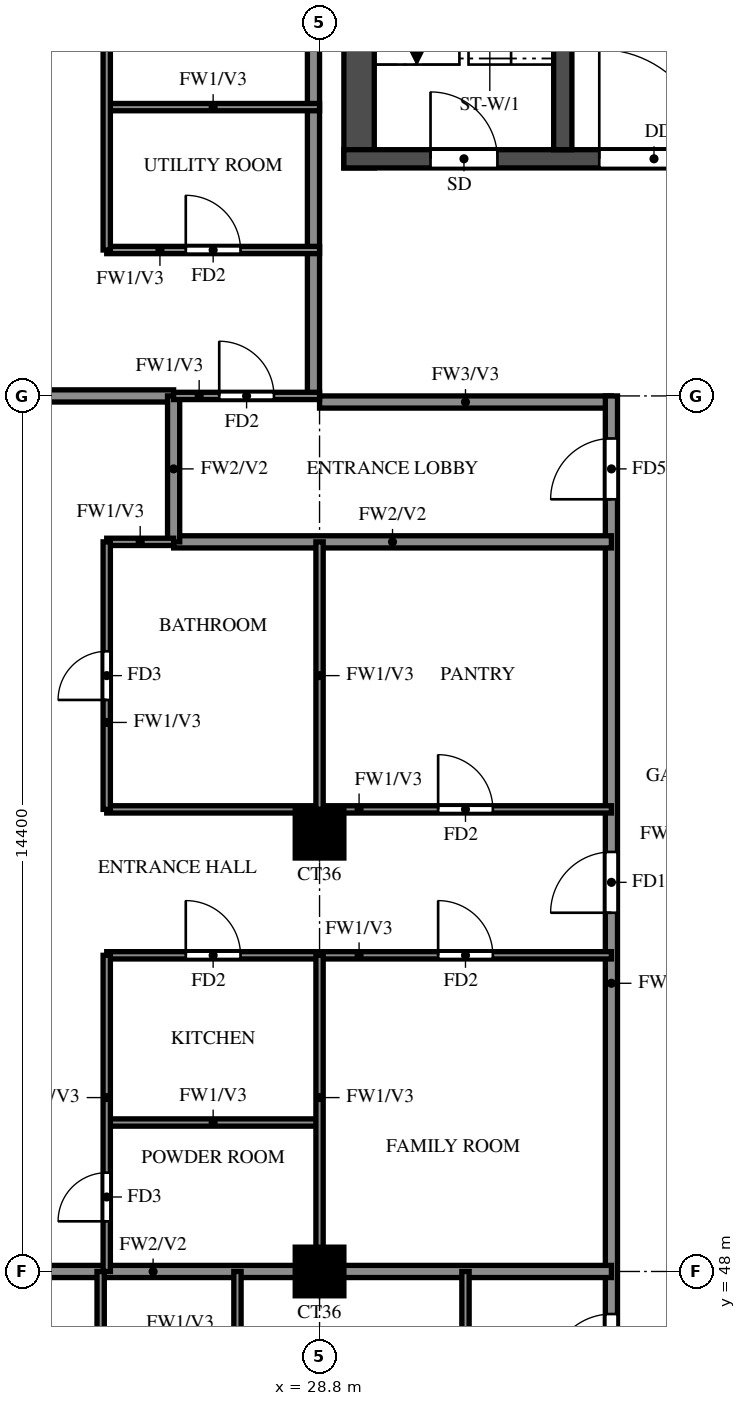
"""IFC4 building model, lengths in metres.
Left out: names, types, materials, properties, quantities, classifications, styles, units other than length and angle.
Written with IfcOpenShell. Run it as: python <this file> out.ifc"""

import sys

from ifc_helpers import new_model, si_unit, direction, frame, frame_2d, origin, origin_2d, place, context, subcontext, project, spatial, rectangle, extrude, source, transform, mapped, element, fill, save


model = new_model("IFC4")
c1 = context("Model", 3, precision=1e-05, world=origin(), true_north=direction((0.0, 1.0)))
c2 = subcontext(c1, "Body", "Model", "MODEL_VIEW")
j1 = project(units=[si_unit("LENGTHUNIT", "METRE"), si_unit("PLANEANGLEUNIT", "RADIAN")], contexts=[c1])
p1 = place(None, origin())
s1 = spatial("IfcSite", under=j1, at=p1, CompositionType="ELEMENT")
p2 = place(p1, origin())
s2 = spatial("IfcBuilding", under=s1, at=p2, CompositionType="ELEMENT")
p3 = place(p2, frame((0.0, 0.0, 250.0)))
s3 = spatial("IfcBuildingStorey", under=s2, at=p3, CompositionType="ELEMENT", Elevation=250.0)
m1 = source(origin(), c2, "Body", "SweptSolid", [
    extrude(rectangle(XDim=0.8, YDim=0.8, at=origin_2d()), origin(), (0.0, 0.0, 1.0), 3.22),
])
for number, where, z_axis, x_axis in (
    (1, (28.8, 48.0, 0.0), (0.0, 0.0, 1.0), (1.0, 0.0, 0.0)),
    (2, (28.8, 55.2, 0.0), (0.0, 0.0, 1.0), (1.0, 0.0, 0.0)),
):
    element("IfcColumn", number, at=place(p3, frame(where, z_axis=z_axis, x_axis=x_axis)), inside=s3, PredefinedType="COLUMN", context=c2, shape_type="MappedRepresentation", body=[
        mapped(m1, transform((0.0, 0.0, 0.0))),
    ])
p4 = place(p3, frame((29.45, 66.15, 0.0), z_axis=(0.0, 0.0, 1.0), x_axis=(0.0, 1.0, 0.0)))
e3 = element("IfcWall", 3, at=p4, inside=s3, PredefinedType="SHEAR", context=c2, shape_type="SweptSolid", body=[
    extrude(rectangle(XDim=11.85, YDim=0.5, at=frame_2d((5.925, 0.0))), origin(), (0.0, 0.0, 1.0), 3.22),
])
p5 = place(p3, frame((29.2, 66.3, 0.0), z_axis=(0.0, 0.0, 1.0), x_axis=(1.0, 0.0, 0.0)))
e4 = element("IfcWall", 4, at=p5, inside=s3, PredefinedType="SHEAR", context=c2, shape_type="SweptSolid", body=[
    extrude(rectangle(XDim=42.4, YDim=0.3, at=frame_2d((21.2, 0.0))), origin(), (0.0, 0.0, 1.0), 3.22),
])
p6 = place(p5, frame((1.425, 0.0, 0.0)))
e5 = element("IfcOpeningElement", 5, at=p6, cuts=e4, PredefinedType="OPENING", context=c2, shape_type="SweptSolid", body=[
    extrude(rectangle(XDim=1.1, YDim=2.1, at=frame_2d((0.55, 1.05))), frame((0.0, 0.16, 0.0), z_axis=(0.0, -1.0, 0.0), x_axis=(1.0, 0.0, 0.0)), (0.0, 0.0, 1.0), 0.32),
])
p7 = place(p5, frame((4.2, 0.0, 0.0)))
e6 = element("IfcOpeningElement", 6, at=p7, cuts=e4, PredefinedType="OPENING", context=c2, shape_type="SweptSolid", body=[
    extrude(rectangle(XDim=1.8, YDim=2.1, at=frame_2d((0.9, 1.05))), frame((0.0, 0.16, 0.0), z_axis=(0.0, -1.0, 0.0), x_axis=(1.0, 0.0, 0.0)), (0.0, 0.0, 1.0), 0.32),
])
p8 = place(p3, frame((32.8, 66.45, 0.0), z_axis=(0.0, 0.0, 1.0), x_axis=(0.0, 1.0, 0.0)))
e7 = element("IfcWall", 7, at=p8, inside=s3, PredefinedType="SHEAR", context=c2, shape_type="SweptSolid", body=[
    extrude(rectangle(XDim=11.05, YDim=0.3, at=frame_2d((5.525, 0.0))), origin(), (0.0, 0.0, 1.0), 3.22),
])
p9 = place(p3, frame((28.8, 62.3, 0.0), z_axis=(0.0, 0.0, 1.0), x_axis=(1.0, 0.0, 0.0)))
e8 = element("IfcWall", 8, at=p9, inside=s3, PredefinedType="SOLIDWALL", context=c2, shape_type="SweptSolid", body=[
    extrude(rectangle(XDim=4.8, YDim=0.2, at=frame_2d((2.4, 0.0))), origin(), (0.0, 0.0, 1.0), 3.22),
])
p10 = place(p3, frame((28.7, 62.4, 0.0), z_axis=(0.0, 0.0, 1.0), x_axis=(0.0, 1.0, 0.0)))
e9 = element("IfcWall", 9, at=p10, inside=s3, PredefinedType="SOLIDWALL", context=c2, shape_type="SweptSolid", body=[
    extrude(rectangle(XDim=15.6, YDim=0.2, at=frame_2d((7.8, 0.0))), origin(), (0.0, 0.0, 1.0), 3.22),
])
p11 = place(p3, frame((33.6, 45.6, 0.0), z_axis=(0.0, 0.0, 1.0), x_axis=(0.0, 1.0, 0.0)))
e10 = element("IfcWall", 10, at=p11, inside=s3, PredefinedType="SOLIDWALL", context=c2, shape_type="SweptSolid", body=[
    extrude(rectangle(XDim=16.8, YDim=0.2, at=frame_2d((8.4, 0.0))), origin(), (0.0, 0.0, 1.0), 3.22),
])
p12 = place(p11, frame((0.7, 0.0, 0.0)))
e11 = element("IfcOpeningElement", 11, at=p12, cuts=e10, PredefinedType="OPENING", context=c2, shape_type="SweptSolid", body=[
    extrude(rectangle(XDim=1.0, YDim=2.1, at=frame_2d((0.5, 1.05))), frame((0.0, 0.11, 0.0), z_axis=(0.0, -1.0, 0.0), x_axis=(1.0, 0.0, 0.0)), (0.0, 0.0, 1.0), 0.22),
])
p13 = place(p11, frame((8.3, 0.0, 0.0)))
e12 = element("IfcOpeningElement", 12, at=p13, cuts=e10, PredefinedType="OPENING", context=c2, shape_type="SweptSolid", body=[
    extrude(rectangle(XDim=1.0, YDim=2.1, at=frame_2d((0.5, 1.05))), frame((0.0, 0.11, 0.0), z_axis=(0.0, -1.0, 0.0), x_axis=(1.0, 0.0, 0.0)), (0.0, 0.0, 1.0), 0.22),
])
p14 = place(p11, frame((15.1, 0.0, 0.0)))
e13 = element("IfcOpeningElement", 13, at=p14, cuts=e10, PredefinedType="OPENING", context=c2, shape_type="SweptSolid", body=[
    extrude(rectangle(XDim=1.0, YDim=2.1, at=frame_2d((0.5, 1.05))), frame((0.0, 0.11, 0.0), z_axis=(0.0, -1.0, 0.0), x_axis=(1.0, 0.0, 0.0)), (0.0, 0.0, 1.0), 0.22),
])
p15 = place(p3, frame((18.525, 48.0, 0.0), z_axis=(0.0, 0.0, 1.0), x_axis=(1.0, 0.0, 0.0)))
e14 = element("IfcWall", 14, at=p15, inside=s3, PredefinedType="SOLIDWALL", context=c2, shape_type="SweptSolid", body=[
    extrude(rectangle(XDim=15.075, YDim=0.2, at=frame_2d((7.538, 0.0))), origin(), (0.0, 0.0, 1.0), 3.22),
])
p16 = place(p3, frame((26.4, 60.0, 0.0), z_axis=(0.0, 0.0, 1.0), x_axis=(1.0, 0.0, 0.0)))
e15 = element("IfcWall", 15, at=p16, inside=s3, PredefinedType="SOLIDWALL", context=c2, shape_type="SweptSolid", body=[
    extrude(rectangle(XDim=7.2, YDim=0.2, at=frame_2d((3.6, 0.0))), origin(), (0.0, 0.0, 1.0), 3.22),
])
p17 = place(p3, frame((18.525, 62.4, 0.0), z_axis=(0.0, 0.0, 1.0), x_axis=(1.0, 0.0, 0.0)))
e16 = element("IfcWall", 16, at=p17, inside=s3, PredefinedType="SOLIDWALL", context=c2, shape_type="SweptSolid", body=[
    extrude(rectangle(XDim=7.875, YDim=0.2, at=frame_2d((3.938, 0.0))), origin(), (0.0, 0.0, 1.0), 3.22),
])
p18 = place(p3, frame((26.4, 60.0, 0.0), z_axis=(0.0, 0.0, 1.0), x_axis=(0.0, 1.0, 0.0)))
e17 = element("IfcWall", 17, at=p18, inside=s3, PredefinedType="SOLIDWALL", context=c2, shape_type="SweptSolid", body=[
    extrude(rectangle(XDim=2.4, YDim=0.2, at=frame_2d((1.2, 0.0))), origin(), (0.0, 0.0, 1.0), 3.22),
])
p19 = place(p3, frame((25.3, 50.45, 0.0), z_axis=(0.0, 0.0, 1.0), x_axis=(1.0, 0.0, 0.0)))
e18 = element("IfcWall", 18, at=p19, inside=s3, PredefinedType="PARTITIONING", context=c2, shape_type="SweptSolid", body=[
    extrude(rectangle(XDim=3.5, YDim=0.12, at=frame_2d((1.75, 0.0))), origin(), (0.0, 0.0, 1.0), 3.22),
])
p20 = place(p3, frame((25.3, 53.2, 0.0), z_axis=(0.0, 0.0, 1.0), x_axis=(1.0, 0.0, 0.0)))
e19 = element("IfcWall", 19, at=p20, inside=s3, PredefinedType="PARTITIONING", context=c2, shape_type="SweptSolid", body=[
    extrude(rectangle(XDim=8.3, YDim=0.12, at=frame_2d((4.15, 0.0))), origin(), (0.0, 0.0, 1.0), 3.22),
])
p21 = place(p20, frame((1.3, 0.0, 0.0)))
e20 = element("IfcOpeningElement", 20, at=p21, cuts=e19, PredefinedType="OPENING", context=c2, shape_type="SweptSolid", body=[
    extrude(rectangle(XDim=0.9, YDim=2.1, at=frame_2d((0.45, 1.05))), frame((0.0, 0.07, 0.0), z_axis=(0.0, -1.0, 0.0), x_axis=(1.0, 0.0, 0.0)), (0.0, 0.0, 1.0), 0.14),
])
p22 = place(p20, frame((5.45, 0.0, 0.0)))
e21 = element("IfcOpeningElement", 21, at=p22, cuts=e19, PredefinedType="OPENING", context=c2, shape_type="SweptSolid", body=[
    extrude(rectangle(XDim=0.9, YDim=2.1, at=frame_2d((0.45, 1.05))), frame((0.0, 0.07, 0.0), z_axis=(0.0, -1.0, 0.0), x_axis=(1.0, 0.0, 0.0)), (0.0, 0.0, 1.0), 0.14),
])
p23 = place(p3, frame((25.3, 55.6, 0.0), z_axis=(0.0, 0.0, 1.0), x_axis=(1.0, 0.0, 0.0)))
e22 = element("IfcWall", 22, at=p23, inside=s3, PredefinedType="PARTITIONING", context=c2, shape_type="SweptSolid", body=[
    extrude(rectangle(XDim=8.3, YDim=0.12, at=frame_2d((4.15, 0.0))), origin(), (0.0, 0.0, 1.0), 3.22),
])
p24 = place(p23, frame((5.45, 0.0, 0.0)))
e23 = element("IfcOpeningElement", 23, at=p24, cuts=e22, PredefinedType="OPENING", context=c2, shape_type="SweptSolid", body=[
    extrude(rectangle(XDim=0.9, YDim=2.1, at=frame_2d((0.45, 1.05))), frame((0.0, 0.07, 0.0), z_axis=(0.0, -1.0, 0.0), x_axis=(1.0, 0.0, 0.0)), (0.0, 0.0, 1.0), 0.14),
])
p25 = place(p3, frame((25.3, 60.0, 0.0), z_axis=(0.0, 0.0, 1.0), x_axis=(1.0, 0.0, 0.0)))
e24 = element("IfcWall", 24, at=p25, inside=s3, PredefinedType="PARTITIONING", context=c2, shape_type="SweptSolid", body=[
    extrude(rectangle(XDim=1.1, YDim=0.12, at=frame_2d((0.55, 0.0))), origin(), (0.0, 0.0, 1.0), 3.22),
])
p26 = place(p3, frame((26.4, 62.4, 0.0), z_axis=(0.0, 0.0, 1.0), x_axis=(1.0, 0.0, 0.0)))
e25 = element("IfcWall", 25, at=p26, inside=s3, PredefinedType="PARTITIONING", context=c2, shape_type="SweptSolid", body=[
    extrude(rectangle(XDim=2.4, YDim=0.12, at=frame_2d((1.2, 0.0))), origin(), (0.0, 0.0, 1.0), 3.22),
])
p27 = place(p26, frame((0.75, 0.0, 0.0)))
e26 = element("IfcOpeningElement", 26, at=p27, cuts=e25, PredefinedType="OPENING", context=c2, shape_type="SweptSolid", body=[
    extrude(rectangle(XDim=0.9, YDim=2.1, at=frame_2d((0.45, 1.05))), frame((0.0, 0.07, 0.0), z_axis=(0.0, -1.0, 0.0), x_axis=(1.0, 0.0, 0.0)), (0.0, 0.0, 1.0), 0.14),
])
p28 = place(p3, frame((25.3, 64.8, 0.0), z_axis=(0.0, 0.0, 1.0), x_axis=(1.0, 0.0, 0.0)))
e27 = element("IfcWall", 27, at=p28, inside=s3, PredefinedType="PARTITIONING", context=c2, shape_type="SweptSolid", body=[
    extrude(rectangle(XDim=3.5, YDim=0.12, at=frame_2d((1.75, 0.0))), origin(), (0.0, 0.0, 1.0), 3.22),
])
p29 = place(p28, frame((1.3, 0.0, 0.0)))
e28 = element("IfcOpeningElement", 28, at=p29, cuts=e27, PredefinedType="OPENING", context=c2, shape_type="SweptSolid", body=[
    extrude(rectangle(XDim=0.9, YDim=2.1, at=frame_2d((0.45, 1.05))), frame((0.0, 0.07, 0.0), z_axis=(0.0, -1.0, 0.0), x_axis=(1.0, 0.0, 0.0)), (0.0, 0.0, 1.0), 0.14),
])
p30 = place(p3, frame((25.3, 67.15, 0.0), z_axis=(0.0, 0.0, 1.0), x_axis=(1.0, 0.0, 0.0)))
e29 = element("IfcWall", 29, at=p30, inside=s3, PredefinedType="PARTITIONING", context=c2, shape_type="SweptSolid", body=[
    extrude(rectangle(XDim=3.5, YDim=0.12, at=frame_2d((1.75, 0.0))), origin(), (0.0, 0.0, 1.0), 3.22),
])
p31 = place(p3, frame((25.2, 39.725, 0.0), z_axis=(0.0, 0.0, 1.0), x_axis=(0.0, 1.0, 0.0)))
e30 = element("IfcWall", 30, at=p31, inside=s3, PredefinedType="PARTITIONING", context=c2, shape_type="SweptSolid", body=[
    extrude(rectangle(XDim=8.275, YDim=0.12, at=frame_2d((4.137, 0.0))), origin(), (0.0, 0.0, 1.0), 3.22),
])
p32 = place(p31, frame((4.525, 0.0, 0.0)))
e31 = element("IfcOpeningElement", 31, at=p32, cuts=e30, PredefinedType="OPENING", context=c2, shape_type="SweptSolid", body=[
    extrude(rectangle(XDim=0.9, YDim=2.1, at=frame_2d((0.45, 1.05))), frame((0.0, 0.07, 0.0), z_axis=(0.0, -1.0, 0.0), x_axis=(1.0, 0.0, 0.0)), (0.0, 0.0, 1.0), 0.14),
])
p33 = place(p3, frame((25.3, 48.0, 0.0), z_axis=(0.0, 0.0, 1.0), x_axis=(0.0, 1.0, 0.0)))
e32 = element("IfcWall", 32, at=p33, inside=s3, PredefinedType="PARTITIONING", context=c2, shape_type="SweptSolid", body=[
    extrude(rectangle(XDim=5.2, YDim=0.12, at=frame_2d((2.6, 0.0))), origin(), (0.0, 0.0, 1.0), 3.22),
])
p34 = place(p33, frame((0.825, 0.0, 0.0)))
e33 = element("IfcOpeningElement", 33, at=p34, cuts=e32, PredefinedType="OPENING", context=c2, shape_type="SweptSolid", body=[
    extrude(rectangle(XDim=0.8, YDim=2.1, at=frame_2d((0.4, 1.05))), frame((0.0, 0.07, 0.0), z_axis=(0.0, -1.0, 0.0), x_axis=(1.0, 0.0, 0.0)), (0.0, 0.0, 1.0), 0.14),
])
p35 = place(p3, frame((25.3, 55.6, 0.0), z_axis=(0.0, 0.0, 1.0), x_axis=(0.0, 1.0, 0.0)))
e34 = element("IfcWall", 34, at=p35, inside=s3, PredefinedType="PARTITIONING", context=c2, shape_type="SweptSolid", body=[
    extrude(rectangle(XDim=4.4, YDim=0.12, at=frame_2d((2.2, 0.0))), origin(), (0.0, 0.0, 1.0), 3.22),
])
p36 = place(p35, frame((1.8, 0.0, 0.0)))
e35 = element("IfcOpeningElement", 35, at=p36, cuts=e34, PredefinedType="OPENING", context=c2, shape_type="SweptSolid", body=[
    extrude(rectangle(XDim=0.8, YDim=2.1, at=frame_2d((0.4, 1.05))), frame((0.0, 0.07, 0.0), z_axis=(0.0, -1.0, 0.0), x_axis=(1.0, 0.0, 0.0)), (0.0, 0.0, 1.0), 0.14),
])
p37 = place(p3, frame((25.3, 64.8, 0.0), z_axis=(0.0, 0.0, 1.0), x_axis=(0.0, 1.0, 0.0)))
e36 = element("IfcWall", 36, at=p37, inside=s3, PredefinedType="PARTITIONING", context=c2, shape_type="SweptSolid", body=[
    extrude(rectangle(XDim=8.4, YDim=0.12, at=frame_2d((4.2, 0.0))), origin(), (0.0, 0.0, 1.0), 3.22),
])
p38 = place(p37, frame((4.925, 0.0, 0.0)))
e37 = element("IfcOpeningElement", 37, at=p38, cuts=e36, PredefinedType="OPENING", context=c2, shape_type="SweptSolid", body=[
    extrude(rectangle(XDim=0.9, YDim=2.1, at=frame_2d((0.45, 1.05))), frame((0.0, 0.07, 0.0), z_axis=(0.0, -1.0, 0.0), x_axis=(1.0, 0.0, 0.0)), (0.0, 0.0, 1.0), 0.14),
])
p39 = place(p3, frame((27.45, 45.6, 0.0), z_axis=(0.0, 0.0, 1.0), x_axis=(0.0, 1.0, 0.0)))
e38 = element("IfcWall", 38, at=p39, inside=s3, PredefinedType="PARTITIONING", context=c2, shape_type="SweptSolid", body=[
    extrude(rectangle(XDim=2.4, YDim=0.12, at=frame_2d((1.2, 0.0))), origin(), (0.0, 0.0, 1.0), 3.22),
])
p40 = place(p3, frame((28.8, 48.0, 0.0), z_axis=(0.0, 0.0, 1.0), x_axis=(0.0, 1.0, 0.0)))
e39 = element("IfcWall", 39, at=p40, inside=s3, PredefinedType="PARTITIONING", context=c2, shape_type="SweptSolid", body=[
    extrude(rectangle(XDim=5.2, YDim=0.12, at=frame_2d((2.6, 0.0))), origin(), (0.0, 0.0, 1.0), 3.22),
])
p41 = place(p3, frame((28.8, 55.6, 0.0), z_axis=(0.0, 0.0, 1.0), x_axis=(0.0, 1.0, 0.0)))
e40 = element("IfcWall", 40, at=p41, inside=s3, PredefinedType="PARTITIONING", context=c2, shape_type="SweptSolid", body=[
    extrude(rectangle(XDim=4.4, YDim=0.12, at=frame_2d((2.2, 0.0))), origin(), (0.0, 0.0, 1.0), 3.22),
])
p42 = place(p3, frame((31.2, 45.6, 0.0), z_axis=(0.0, 0.0, 1.0), x_axis=(0.0, 1.0, 0.0)))
e41 = element("IfcWall", 41, at=p42, inside=s3, PredefinedType="PARTITIONING", context=c2, shape_type="SweptSolid", body=[
    extrude(rectangle(XDim=2.4, YDim=0.12, at=frame_2d((1.2, 0.0))), origin(), (0.0, 0.0, 1.0), 3.22),
])
p43 = place(p6, origin())
e42 = element("IfcDoor", 42, at=p43, inside=s3, OperationType="SINGLE_SWING_LEFT", PredefinedType="DOOR", context=c2, shape_type="SweptSolid", body=[
    extrude(rectangle(XDim=1.1, YDim=2.1, at=frame_2d((0.55, 1.05))), frame((0.0, 0.025, 0.0), z_axis=(0.0, -1.0, 0.0), x_axis=(1.0, 0.0, 0.0)), (0.0, 0.0, 1.0), 0.05),
])
fill(e5, e42)
p44 = place(p7, origin())
e43 = element("IfcDoor", 43, at=p44, inside=s3, OperationType="DOUBLE_DOOR_SINGLE_SWING", PredefinedType="DOOR", context=c2, shape_type="SweptSolid", body=[
    extrude(rectangle(XDim=1.8, YDim=2.1, at=frame_2d((0.9, 1.05))), frame((0.0, 0.025, 0.0), z_axis=(0.0, -1.0, 0.0), x_axis=(1.0, 0.0, 0.0)), (0.0, 0.0, 1.0), 0.05),
])
fill(e6, e43)
p45 = place(p12, origin())
e44 = element("IfcDoor", 44, at=p45, inside=s3, OperationType="SINGLE_SWING_LEFT", PredefinedType="DOOR", context=c2, shape_type="SweptSolid", body=[
    extrude(rectangle(XDim=1.0, YDim=2.1, at=frame_2d((0.5, 1.05))), frame((0.0, 0.025, 0.0), z_axis=(0.0, -1.0, 0.0), x_axis=(1.0, 0.0, 0.0)), (0.0, 0.0, 1.0), 0.05),
])
fill(e11, e44)
p46 = place(p13, origin())
e45 = element("IfcDoor", 45, at=p46, inside=s3, OperationType="SINGLE_SWING_LEFT", PredefinedType="DOOR", context=c2, shape_type="SweptSolid", body=[
    extrude(rectangle(XDim=1.0, YDim=2.1, at=frame_2d((0.5, 1.05))), frame((0.0, 0.025, 0.0), z_axis=(0.0, -1.0, 0.0), x_axis=(1.0, 0.0, 0.0)), (0.0, 0.0, 1.0), 0.05),
])
fill(e12, e45)
p47 = place(p34, origin())
e46 = element("IfcDoor", 46, at=p47, inside=s3, OperationType="SINGLE_SWING_RIGHT", PredefinedType="DOOR", context=c2, shape_type="SweptSolid", body=[
    extrude(rectangle(XDim=0.8, YDim=2.1, at=frame_2d((0.4, 1.05))), frame((0.0, 0.025, 0.0), z_axis=(0.0, -1.0, 0.0), x_axis=(1.0, 0.0, 0.0)), (0.0, 0.0, 1.0), 0.05),
])
fill(e33, e46)
p48 = place(p21, origin())
e47 = element("IfcDoor", 47, at=p48, inside=s3, OperationType="SINGLE_SWING_LEFT", PredefinedType="DOOR", context=c2, shape_type="SweptSolid", body=[
    extrude(rectangle(XDim=0.9, YDim=2.1, at=frame_2d((0.45, 1.05))), frame((0.0, 0.025, 0.0), z_axis=(0.0, -1.0, 0.0), x_axis=(1.0, 0.0, 0.0)), (0.0, 0.0, 1.0), 0.05),
])
fill(e20, e47)
p49 = place(p36, origin())
e48 = element("IfcDoor", 48, at=p49, inside=s3, OperationType="SINGLE_SWING_LEFT", PredefinedType="DOOR", context=c2, shape_type="SweptSolid", body=[
    extrude(rectangle(XDim=0.8, YDim=2.1, at=frame_2d((0.4, 1.05))), frame((0.0, 0.025, 0.0), z_axis=(0.0, -1.0, 0.0), x_axis=(1.0, 0.0, 0.0)), (0.0, 0.0, 1.0), 0.05),
])
fill(e35, e48)
p50 = place(p22, origin())
e49 = element("IfcDoor", 49, at=p50, inside=s3, OperationType="SINGLE_SWING_RIGHT", PredefinedType="DOOR", context=c2, shape_type="SweptSolid", body=[
    extrude(rectangle(XDim=0.9, YDim=2.1, at=frame_2d((0.45, 1.05))), frame((0.0, 0.025, 0.0), z_axis=(0.0, -1.0, 0.0), x_axis=(1.0, 0.0, 0.0)), (0.0, 0.0, 1.0), 0.05),
])
fill(e21, e49)
p51 = place(p24, origin())
e50 = element("IfcDoor", 50, at=p51, inside=s3, OperationType="SINGLE_SWING_LEFT", PredefinedType="DOOR", context=c2, shape_type="SweptSolid", body=[
    extrude(rectangle(XDim=0.9, YDim=2.1, at=frame_2d((0.45, 1.05))), frame((0.0, 0.025, 0.0), z_axis=(0.0, -1.0, 0.0), x_axis=(1.0, 0.0, 0.0)), (0.0, 0.0, 1.0), 0.05),
])
fill(e23, e50)
p52 = place(p27, origin())
e51 = element("IfcDoor", 51, at=p52, inside=s3, OperationType="SINGLE_SWING_LEFT", PredefinedType="DOOR", context=c2, shape_type="SweptSolid", body=[
    extrude(rectangle(XDim=0.9, YDim=2.1, at=frame_2d((0.45, 1.05))), frame((0.0, 0.025, 0.0), z_axis=(0.0, -1.0, 0.0), x_axis=(1.0, 0.0, 0.0)), (0.0, 0.0, 1.0), 0.05),
])
fill(e26, e51)
p53 = place(p14, origin())
e52 = element("IfcDoor", 52, at=p53, inside=s3, OperationType="SINGLE_SWING_RIGHT", PredefinedType="DOOR", context=c2, shape_type="SweptSolid", body=[
    extrude(rectangle(XDim=1.0, YDim=2.1, at=frame_2d((0.5, 1.05))), frame((0.0, 0.025, 0.0), z_axis=(0.0, -1.0, 0.0), x_axis=(1.0, 0.0, 0.0)), (0.0, 0.0, 1.0), 0.05),
])
fill(e13, e52)
p54 = place(p29, origin())
e53 = element("IfcDoor", 53, at=p54, inside=s3, OperationType="SINGLE_SWING_LEFT", PredefinedType="DOOR", context=c2, shape_type="SweptSolid", body=[
    extrude(rectangle(XDim=0.9, YDim=2.1, at=frame_2d((0.45, 1.05))), frame((0.0, 0.025, 0.0), z_axis=(0.0, -1.0, 0.0), x_axis=(1.0, 0.0, 0.0)), (0.0, 0.0, 1.0), 0.05),
])
fill(e28, e53)
save(model, sys.argv[1])
